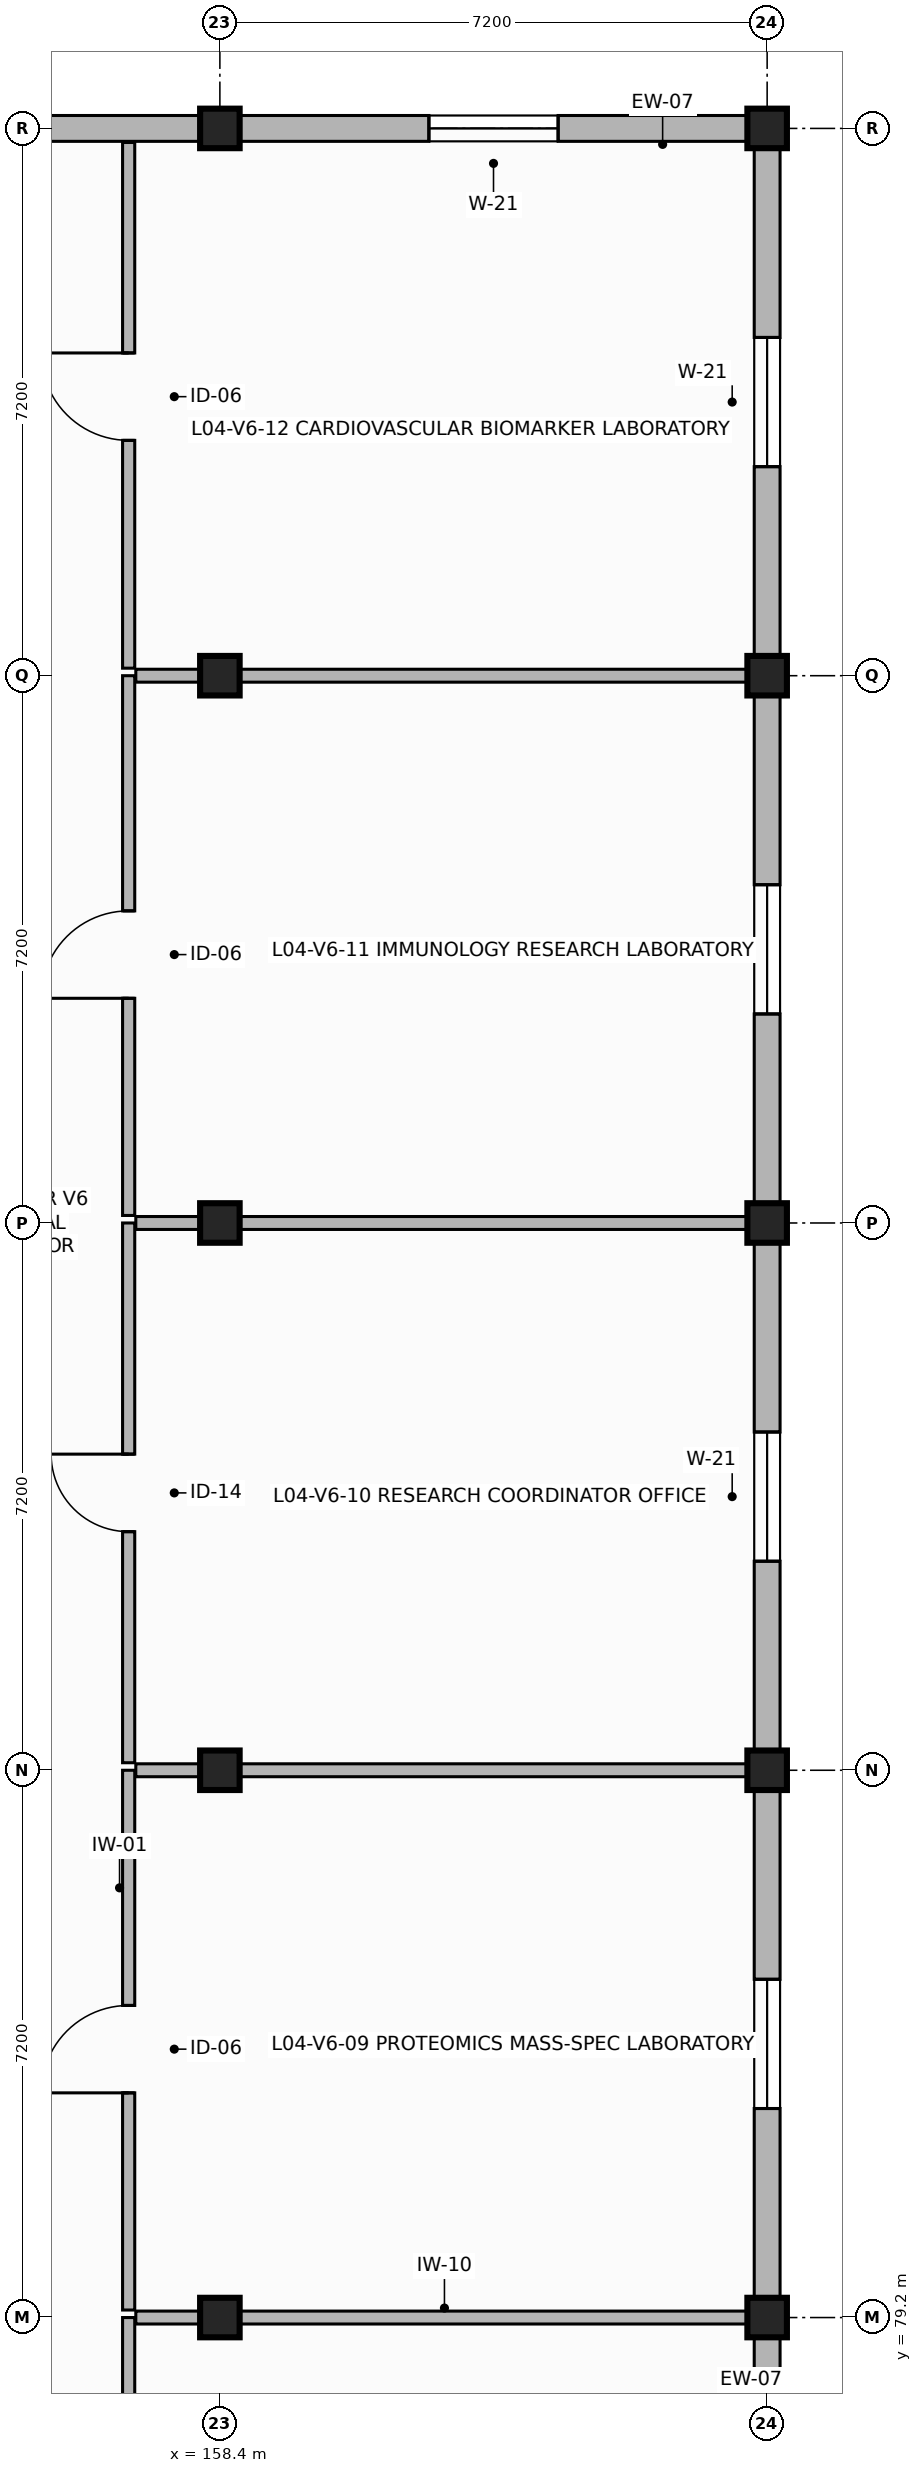
"""IFC4 building model, lengths in metres.
Left out: names, types, materials, properties, quantities, classifications, styles, units other than length and angle.
Written with IfcOpenShell. Run it as: python <this file> out.ifc"""

import sys

from ifc_helpers import new_model, si_unit, direction, frame, frame_2d, origin, origin_2d, place, context, subcontext, project, spatial, rectangle, extrude, element, fill, save


model = new_model("IFC4")
c1 = context("Model", 3, precision=1e-05, world=origin(), true_north=direction((0.0, 1.0)))
c2 = subcontext(c1, "Body", "Model", "MODEL_VIEW")
j1 = project(units=[si_unit("LENGTHUNIT", "METRE"), si_unit("PLANEANGLEUNIT", "RADIAN")], contexts=[c1])
p1 = place(None, origin())
s1 = spatial("IfcSite", under=j1, at=p1, CompositionType="ELEMENT")
p2 = place(p1, origin())
s2 = spatial("IfcBuilding", under=s1, at=p2, CompositionType="ELEMENT")
p3 = place(p2, frame((0.0, 0.0, 16.0)))
s3 = spatial("IfcBuildingStorey", under=s2, at=p3, CompositionType="ELEMENT", Elevation=16.0)
for number, where, z_axis, x_axis in (
    (1, (158.4, 79.2, 0.0), (0.0, 0.0, 1.0), (1.0, 0.0, 0.0)),
    (2, (158.4, 86.4, 0.0), (0.0, 0.0, 1.0), (1.0, 0.0, 0.0)),
    (3, (158.4, 93.6, 0.0), (0.0, 0.0, 1.0), (1.0, 0.0, 0.0)),
    (4, (158.4, 100.8, 0.0), (0.0, 0.0, 1.0), (1.0, 0.0, 0.0)),
    (5, (158.4, 108.0, 0.0), (0.0, 0.0, 1.0), (1.0, 0.0, 0.0)),
    (6, (165.6, 79.2, 0.0), (0.0, 0.0, 1.0), (1.0, 0.0, 0.0)),
    (7, (165.6, 86.4, 0.0), (0.0, 0.0, 1.0), (1.0, 0.0, 0.0)),
    (8, (165.6, 93.6, 0.0), (0.0, 0.0, 1.0), (1.0, 0.0, 0.0)),
    (9, (165.6, 100.8, 0.0), (0.0, 0.0, 1.0), (1.0, 0.0, 0.0)),
    (10, (165.6, 108.0, 0.0), (0.0, 0.0, 1.0), (1.0, 0.0, 0.0)),
):
    element("IfcColumn", number, at=place(p3, frame(where, z_axis=z_axis, x_axis=x_axis)), inside=s3, PredefinedType="COLUMN", context=c2, shape_type="SweptSolid", body=[
        extrude(rectangle(XDim=0.52, YDim=0.52, at=origin_2d()), origin(), (0.0, 0.0, 1.0), 3.38),
    ])
p4 = place(p3, frame((165.6, 72.0, 0.0), z_axis=(0.0, 0.0, 1.0), x_axis=(0.0, 1.0, 0.0)))
e11 = element("IfcWall", 11, at=p4, inside=s3, PredefinedType="SOLIDWALL", context=c2, shape_type="SweptSolid", body=[
    extrude(rectangle(XDim=7.2, YDim=0.34, at=frame_2d((3.6, 0.0))), origin(), (0.0, 0.0, 1.0), 2.71),
])
p5 = place(p4, frame((2.75, 0.0, 0.85)))
e12 = element("IfcOpeningElement", 12, at=p5, cuts=e11, PredefinedType="OPENING", context=c2, shape_type="SweptSolid", body=[
    extrude(rectangle(XDim=1.7, YDim=1.65, at=frame_2d((0.85, 0.825))), frame((0.0, 0.18, 0.0), z_axis=(0.0, -1.0, 0.0), x_axis=(1.0, 0.0, 0.0)), (0.0, 0.0, 1.0), 0.36),
])
p6 = place(p3, frame((165.6, 79.2, 0.0), z_axis=(0.0, 0.0, 1.0), x_axis=(0.0, 1.0, 0.0)))
e13 = element("IfcWall", 13, at=p6, inside=s3, PredefinedType="SOLIDWALL", context=c2, shape_type="SweptSolid", body=[
    extrude(rectangle(XDim=7.2, YDim=0.34, at=frame_2d((3.6, 0.0))), origin(), (0.0, 0.0, 1.0), 2.71),
])
p7 = place(p6, frame((2.75, 0.0, 0.85)))
e14 = element("IfcOpeningElement", 14, at=p7, cuts=e13, PredefinedType="OPENING", context=c2, shape_type="SweptSolid", body=[
    extrude(rectangle(XDim=1.7, YDim=1.65, at=frame_2d((0.85, 0.825))), frame((0.0, 0.18, 0.0), z_axis=(0.0, -1.0, 0.0), x_axis=(1.0, 0.0, 0.0)), (0.0, 0.0, 1.0), 0.36),
])
p8 = place(p3, frame((165.6, 86.4, 0.0), z_axis=(0.0, 0.0, 1.0), x_axis=(0.0, 1.0, 0.0)))
e15 = element("IfcWall", 15, at=p8, inside=s3, PredefinedType="SOLIDWALL", context=c2, shape_type="SweptSolid", body=[
    extrude(rectangle(XDim=7.2, YDim=0.34, at=frame_2d((3.6, 0.0))), origin(), (0.0, 0.0, 1.0), 2.71),
])
p9 = place(p8, frame((2.75, 0.0, 0.85)))
e16 = element("IfcOpeningElement", 16, at=p9, cuts=e15, PredefinedType="OPENING", context=c2, shape_type="SweptSolid", body=[
    extrude(rectangle(XDim=1.7, YDim=1.65, at=frame_2d((0.85, 0.825))), frame((0.0, 0.18, 0.0), z_axis=(0.0, -1.0, 0.0), x_axis=(1.0, 0.0, 0.0)), (0.0, 0.0, 1.0), 0.36),
])
p10 = place(p3, frame((165.6, 93.6, 0.0), z_axis=(0.0, 0.0, 1.0), x_axis=(0.0, 1.0, 0.0)))
e17 = element("IfcWall", 17, at=p10, inside=s3, PredefinedType="SOLIDWALL", context=c2, shape_type="SweptSolid", body=[
    extrude(rectangle(XDim=7.2, YDim=0.34, at=frame_2d((3.6, 0.0))), origin(), (0.0, 0.0, 1.0), 2.71),
])
p11 = place(p10, frame((2.75, 0.0, 0.85)))
e18 = element("IfcOpeningElement", 18, at=p11, cuts=e17, PredefinedType="OPENING", context=c2, shape_type="SweptSolid", body=[
    extrude(rectangle(XDim=1.7, YDim=1.65, at=frame_2d((0.85, 0.825))), frame((0.0, 0.18, 0.0), z_axis=(0.0, -1.0, 0.0), x_axis=(1.0, 0.0, 0.0)), (0.0, 0.0, 1.0), 0.36),
])
p12 = place(p3, frame((165.6, 100.8, 0.0), z_axis=(0.0, 0.0, 1.0), x_axis=(0.0, 1.0, 0.0)))
e19 = element("IfcWall", 19, at=p12, inside=s3, PredefinedType="SOLIDWALL", context=c2, shape_type="SweptSolid", body=[
    extrude(rectangle(XDim=7.2, YDim=0.34, at=frame_2d((3.6, 0.0))), origin(), (0.0, 0.0, 1.0), 2.71),
])
p13 = place(p12, frame((2.75, 0.0, 0.85)))
e20 = element("IfcOpeningElement", 20, at=p13, cuts=e19, PredefinedType="OPENING", context=c2, shape_type="SweptSolid", body=[
    extrude(rectangle(XDim=1.7, YDim=1.65, at=frame_2d((0.85, 0.825))), frame((0.0, 0.18, 0.0), z_axis=(0.0, -1.0, 0.0), x_axis=(1.0, 0.0, 0.0)), (0.0, 0.0, 1.0), 0.36),
])
p14 = place(p3, frame((165.6, 108.0, 0.0), z_axis=(0.0, 0.0, 1.0), x_axis=(-1.0, 0.0, 0.0)))
e21 = element("IfcWall", 21, at=p14, inside=s3, PredefinedType="SOLIDWALL", context=c2, shape_type="SweptSolid", body=[
    extrude(rectangle(XDim=7.2, YDim=0.34, at=frame_2d((3.6, 0.0))), origin(), (0.0, 0.0, 1.0), 2.71),
])
p15 = place(p14, frame((2.75, 0.0, 0.85)))
e22 = element("IfcOpeningElement", 22, at=p15, cuts=e21, PredefinedType="OPENING", context=c2, shape_type="SweptSolid", body=[
    extrude(rectangle(XDim=1.7, YDim=1.65, at=frame_2d((0.85, 0.825))), frame((0.0, 0.18, 0.0), z_axis=(0.0, -1.0, 0.0), x_axis=(1.0, 0.0, 0.0)), (0.0, 0.0, 1.0), 0.36),
])
p16 = place(p3, frame((158.4, 108.0, 0.0), z_axis=(0.0, 0.0, 1.0), x_axis=(-1.0, 0.0, 0.0)))
e23 = element("IfcWall", 23, at=p16, inside=s3, PredefinedType="SOLIDWALL", context=c2, shape_type="SweptSolid", body=[
    extrude(rectangle(XDim=7.2, YDim=0.34, at=frame_2d((3.6, 0.0))), origin(), (0.0, 0.0, 1.0), 2.71),
])
p17 = place(p3, frame((157.2, 76.679, 0.0), z_axis=(0.0, 0.0, 1.0), x_axis=(0.0, 1.0, 0.0)))
e24 = element("IfcWall", 24, at=p17, inside=s3, PredefinedType="PARTITIONING", context=c2, shape_type="SweptSolid", body=[
    extrude(rectangle(XDim=2.521, YDim=0.16, at=frame_2d((1.26, 0.0))), origin(), (0.0, 0.0, 1.0), 2.69),
])
p18 = place(p17, frame((0.48, 0.0, 0.0)))
e25 = element("IfcOpeningElement", 25, at=p18, cuts=e24, PredefinedType="OPENING", context=c2, shape_type="SweptSolid", body=[
    extrude(rectangle(XDim=0.98, YDim=2.15, at=frame_2d((0.49, 1.075))), frame((0.0, 0.09, 0.0), z_axis=(0.0, -1.0, 0.0), x_axis=(1.0, 0.0, 0.0)), (0.0, 0.0, 1.0), 0.18),
])
p19 = place(p3, frame((157.294, 79.2, 0.0), z_axis=(0.0, 0.0, 1.0), x_axis=(1.0, 0.0, 0.0)))
e26 = element("IfcWall", 26, at=p19, inside=s3, PredefinedType="PARTITIONING", context=c2, shape_type="SweptSolid", body=[
    extrude(rectangle(XDim=8.121, YDim=0.17, at=frame_2d((4.061, 0.0))), origin(), (0.0, 0.0, 1.0), 2.69),
])
p20 = place(p3, frame((157.2, 79.299, 0.0), z_axis=(0.0, 0.0, 1.0), x_axis=(0.0, 1.0, 0.0)))
e27 = element("IfcWall", 27, at=p20, inside=s3, PredefinedType="PARTITIONING", context=c2, shape_type="SweptSolid", body=[
    extrude(rectangle(XDim=7.101, YDim=0.16, at=frame_2d((3.55, 0.0))), origin(), (0.0, 0.0, 1.0), 2.69),
])
p21 = place(p20, frame((2.857, 0.0, 0.0)))
e28 = element("IfcOpeningElement", 28, at=p21, cuts=e27, PredefinedType="OPENING", context=c2, shape_type="SweptSolid", body=[
    extrude(rectangle(XDim=1.15, YDim=2.25, at=frame_2d((0.575, 1.125))), frame((0.0, 0.09, 0.0), z_axis=(0.0, -1.0, 0.0), x_axis=(1.0, 0.0, 0.0)), (0.0, 0.0, 1.0), 0.18),
])
p22 = place(p3, frame((157.294, 86.4, 0.0), z_axis=(0.0, 0.0, 1.0), x_axis=(1.0, 0.0, 0.0)))
e29 = element("IfcWall", 29, at=p22, inside=s3, PredefinedType="PARTITIONING", context=c2, shape_type="SweptSolid", body=[
    extrude(rectangle(XDim=8.121, YDim=0.17, at=frame_2d((4.061, 0.0))), origin(), (0.0, 0.0, 1.0), 2.69),
])
p23 = place(p3, frame((157.2, 86.499, 0.0), z_axis=(0.0, 0.0, 1.0), x_axis=(0.0, 1.0, 0.0)))
e30 = element("IfcWall", 30, at=p23, inside=s3, PredefinedType="PARTITIONING", context=c2, shape_type="SweptSolid", body=[
    extrude(rectangle(XDim=7.101, YDim=0.16, at=frame_2d((3.551, 0.0))), origin(), (0.0, 0.0, 1.0), 2.69),
])
p24 = place(p23, frame((3.04, 0.0, 0.0)))
e31 = element("IfcOpeningElement", 31, at=p24, cuts=e30, PredefinedType="OPENING", context=c2, shape_type="SweptSolid", body=[
    extrude(rectangle(XDim=1.02, YDim=2.15, at=frame_2d((0.51, 1.075))), frame((0.0, 0.09, 0.0), z_axis=(0.0, -1.0, 0.0), x_axis=(1.0, 0.0, 0.0)), (0.0, 0.0, 1.0), 0.18),
])
p25 = place(p3, frame((157.294, 93.6, 0.0), z_axis=(0.0, 0.0, 1.0), x_axis=(1.0, 0.0, 0.0)))
e32 = element("IfcWall", 32, at=p25, inside=s3, PredefinedType="PARTITIONING", context=c2, shape_type="SweptSolid", body=[
    extrude(rectangle(XDim=8.121, YDim=0.17, at=frame_2d((4.061, 0.0))), origin(), (0.0, 0.0, 1.0), 2.69),
])
p26 = place(p3, frame((157.2, 93.699, 0.0), z_axis=(0.0, 0.0, 1.0), x_axis=(0.0, 1.0, 0.0)))
e33 = element("IfcWall", 33, at=p26, inside=s3, PredefinedType="PARTITIONING", context=c2, shape_type="SweptSolid", body=[
    extrude(rectangle(XDim=7.101, YDim=0.16, at=frame_2d((3.551, 0.0))), origin(), (0.0, 0.0, 1.0), 2.69),
])
p27 = place(p26, frame((2.857, 0.0, 0.0)))
e34 = element("IfcOpeningElement", 34, at=p27, cuts=e33, PredefinedType="OPENING", context=c2, shape_type="SweptSolid", body=[
    extrude(rectangle(XDim=1.15, YDim=2.25, at=frame_2d((0.575, 1.125))), frame((0.0, 0.09, 0.0), z_axis=(0.0, -1.0, 0.0), x_axis=(1.0, 0.0, 0.0)), (0.0, 0.0, 1.0), 0.18),
])
p28 = place(p3, frame((157.294, 100.8, 0.0), z_axis=(0.0, 0.0, 1.0), x_axis=(1.0, 0.0, 0.0)))
e35 = element("IfcWall", 35, at=p28, inside=s3, PredefinedType="PARTITIONING", context=c2, shape_type="SweptSolid", body=[
    extrude(rectangle(XDim=8.121, YDim=0.17, at=frame_2d((4.061, 0.0))), origin(), (0.0, 0.0, 1.0), 2.69),
])
p29 = place(p3, frame((157.2, 100.899, 0.0), z_axis=(0.0, 0.0, 1.0), x_axis=(0.0, 1.0, 0.0)))
e36 = element("IfcWall", 36, at=p29, inside=s3, PredefinedType="PARTITIONING", context=c2, shape_type="SweptSolid", body=[
    extrude(rectangle(XDim=6.916, YDim=0.16, at=frame_2d((3.458, 0.0))), origin(), (0.0, 0.0, 1.0), 2.69),
])
p30 = place(p29, frame((2.997, 0.0, 0.0)))
e37 = element("IfcOpeningElement", 37, at=p30, cuts=e36, PredefinedType="OPENING", context=c2, shape_type="SweptSolid", body=[
    extrude(rectangle(XDim=1.15, YDim=2.25, at=frame_2d((0.575, 1.125))), frame((0.0, 0.09, 0.0), z_axis=(0.0, -1.0, 0.0), x_axis=(1.0, 0.0, 0.0)), (0.0, 0.0, 1.0), 0.18),
])
p31 = place(p7, origin())
e38 = element("IfcWindow", 38, at=p31, inside=s3, PartitioningType="SINGLE_PANEL", PredefinedType="WINDOW", context=c2, shape_type="SweptSolid", body=[
    extrude(rectangle(XDim=1.7, YDim=1.65, at=frame_2d((0.85, 0.825))), frame((0.0, 0.03, 0.0), z_axis=(0.0, -1.0, 0.0), x_axis=(1.0, 0.0, 0.0)), (0.0, 0.0, 1.0), 0.06),
])
fill(e14, e38)
p32 = place(p9, origin())
e39 = element("IfcWindow", 39, at=p32, inside=s3, PartitioningType="SINGLE_PANEL", PredefinedType="WINDOW", context=c2, shape_type="SweptSolid", body=[
    extrude(rectangle(XDim=1.7, YDim=1.65, at=frame_2d((0.85, 0.825))), frame((0.0, 0.03, 0.0), z_axis=(0.0, -1.0, 0.0), x_axis=(1.0, 0.0, 0.0)), (0.0, 0.0, 1.0), 0.06),
])
fill(e16, e39)
p33 = place(p11, origin())
e40 = element("IfcWindow", 40, at=p33, inside=s3, PartitioningType="SINGLE_PANEL", PredefinedType="WINDOW", context=c2, shape_type="SweptSolid", body=[
    extrude(rectangle(XDim=1.7, YDim=1.65, at=frame_2d((0.85, 0.825))), frame((0.0, 0.03, 0.0), z_axis=(0.0, -1.0, 0.0), x_axis=(1.0, 0.0, 0.0)), (0.0, 0.0, 1.0), 0.06),
])
fill(e18, e40)
p34 = place(p13, origin())
e41 = element("IfcWindow", 41, at=p34, inside=s3, PartitioningType="SINGLE_PANEL", PredefinedType="WINDOW", context=c2, shape_type="SweptSolid", body=[
    extrude(rectangle(XDim=1.7, YDim=1.65, at=frame_2d((0.85, 0.825))), frame((0.0, 0.03, 0.0), z_axis=(0.0, -1.0, 0.0), x_axis=(1.0, 0.0, 0.0)), (0.0, 0.0, 1.0), 0.06),
])
fill(e20, e41)
p35 = place(p15, origin())
e42 = element("IfcWindow", 42, at=p35, inside=s3, PartitioningType="SINGLE_PANEL", PredefinedType="WINDOW", context=c2, shape_type="SweptSolid", body=[
    extrude(rectangle(XDim=1.7, YDim=1.65, at=frame_2d((0.85, 0.825))), frame((0.0, 0.03, 0.0), z_axis=(0.0, -1.0, 0.0), x_axis=(1.0, 0.0, 0.0)), (0.0, 0.0, 1.0), 0.06),
])
fill(e22, e42)
p36 = place(p21, origin())
e43 = element("IfcDoor", 43, at=p36, inside=s3, OperationType="SINGLE_SWING_LEFT", PredefinedType="DOOR", context=c2, shape_type="SweptSolid", body=[
    extrude(rectangle(XDim=1.15, YDim=2.25, at=frame_2d((0.575, 1.125))), frame((0.0, 0.025, 0.0), z_axis=(0.0, -1.0, 0.0), x_axis=(1.0, 0.0, 0.0)), (0.0, 0.0, 1.0), 0.05),
])
fill(e28, e43)
p37 = place(p24, origin())
e44 = element("IfcDoor", 44, at=p37, inside=s3, OperationType="SINGLE_SWING_RIGHT", PredefinedType="DOOR", context=c2, shape_type="SweptSolid", body=[
    extrude(rectangle(XDim=1.02, YDim=2.15, at=frame_2d((0.51, 1.075))), frame((0.0, 0.025, 0.0), z_axis=(0.0, -1.0, 0.0), x_axis=(1.0, 0.0, 0.0)), (0.0, 0.0, 1.0), 0.05),
])
fill(e31, e44)
p38 = place(p27, origin())
e45 = element("IfcDoor", 45, at=p38, inside=s3, OperationType="SINGLE_SWING_LEFT", PredefinedType="DOOR", context=c2, shape_type="SweptSolid", body=[
    extrude(rectangle(XDim=1.15, YDim=2.25, at=frame_2d((0.575, 1.125))), frame((0.0, 0.025, 0.0), z_axis=(0.0, -1.0, 0.0), x_axis=(1.0, 0.0, 0.0)), (0.0, 0.0, 1.0), 0.05),
])
fill(e34, e45)
p39 = place(p30, origin())
e46 = element("IfcDoor", 46, at=p39, inside=s3, OperationType="SINGLE_SWING_RIGHT", PredefinedType="DOOR", context=c2, shape_type="SweptSolid", body=[
    extrude(rectangle(XDim=1.15, YDim=2.25, at=frame_2d((0.575, 1.125))), frame((0.0, 0.025, 0.0), z_axis=(0.0, -1.0, 0.0), x_axis=(1.0, 0.0, 0.0)), (0.0, 0.0, 1.0), 0.05),
])
fill(e37, e46)
save(model, sys.argv[1])
